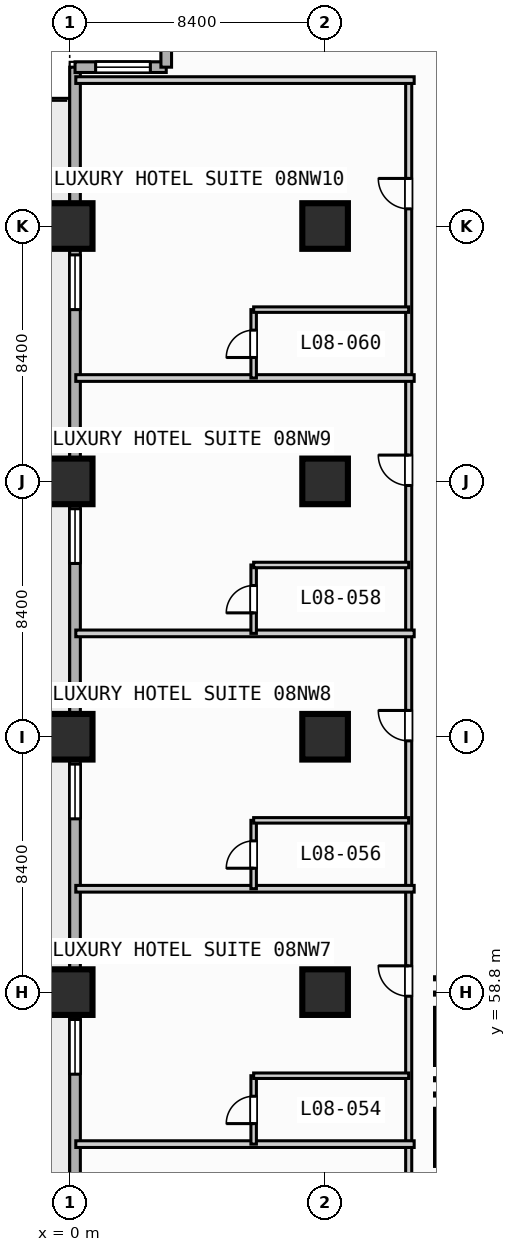
"""IFC4 building model, lengths in metres.
Left out: names, types, materials, properties, quantities, classifications, styles, units other than length and angle.
Written with IfcOpenShell. Run it as: python <this file> out.ifc"""

import sys

from ifc_helpers import new_model, si_unit, direction, frame, frame_2d, origin, origin_2d, place, context, subcontext, project, spatial, rectangle, extrude, element, fill, save


model = new_model("IFC4")
c1 = context("Model", 3, precision=1e-05, world=origin(), true_north=direction((0.0, 1.0)))
c2 = subcontext(c1, "Body", "Model", "MODEL_VIEW")
j1 = project(units=[si_unit("LENGTHUNIT", "METRE"), si_unit("PLANEANGLEUNIT", "RADIAN")], contexts=[c1])
p1 = place(None, origin())
s1 = spatial("IfcSite", under=j1, at=p1, CompositionType="ELEMENT")
p2 = place(p1, origin())
s2 = spatial("IfcBuilding", under=s1, at=p2, CompositionType="ELEMENT")
p3 = place(p2, frame((0.0, 0.0, 39.6)))
s3 = spatial("IfcBuildingStorey", under=s2, at=p3, CompositionType="ELEMENT", Elevation=39.6)
for number, where, z_axis, x_axis in (
    (1, (0.0, 58.8, 0.0), (0.0, 0.0, 1.0), (1.0, 0.0, 0.0)),
    (2, (0.0, 67.2, 0.0), (0.0, 0.0, 1.0), (1.0, 0.0, 0.0)),
    (3, (0.0, 75.6, 0.0), (0.0, 0.0, 1.0), (1.0, 0.0, 0.0)),
    (4, (0.0, 84.0, 0.0), (0.0, 0.0, 1.0), (1.0, 0.0, 0.0)),
    (5, (8.4, 58.8, 0.0), (0.0, 0.0, 1.0), (1.0, 0.0, 0.0)),
    (6, (8.4, 67.2, 0.0), (0.0, 0.0, 1.0), (1.0, 0.0, 0.0)),
    (7, (8.4, 75.6, 0.0), (0.0, 0.0, 1.0), (1.0, 0.0, 0.0)),
    (8, (8.4, 84.0, 0.0), (0.0, 0.0, 1.0), (1.0, 0.0, 0.0)),
):
    element("IfcColumn", number, at=place(p3, frame(where, z_axis=z_axis, x_axis=x_axis)), inside=s3, PredefinedType="COLUMN", context=c2, shape_type="SweptSolid", body=[
        extrude(rectangle(XDim=1.5, YDim=1.5, at=origin_2d()), origin(), (0.0, 0.0, 1.0), 3.8),
    ])
p4 = place(p3, frame((0.175, 3.175, 0.0), z_axis=(0.0, 0.0, 1.0), x_axis=(0.0, 1.0, 0.0)))
e9 = element("IfcWall", 9, at=p4, inside=s3, PredefinedType="STANDARD", context=c2, shape_type="SweptSolid", body=[
    extrude(rectangle(XDim=86.05, YDim=0.35, at=frame_2d((43.025, 0.0))), origin(), (0.0, 0.0, 1.0), 3.55),
])
p5 = place(p4, frame((42.825, 0.0, 0.0)))
e10 = element("IfcOpeningElement", 10, at=p5, cuts=e9, PredefinedType="OPENING", context=c2, shape_type="SweptSolid", body=[
    extrude(rectangle(XDim=1.4, YDim=2.2, at=frame_2d((0.7, 1.1))), frame((0.0, 0.185, 0.0), z_axis=(0.0, -1.0, 0.0), x_axis=(1.0, 0.0, 0.0)), (0.0, 0.0, 1.0), 0.37),
])
p6 = place(p4, frame((2.525, 0.0, 0.85)))
e11 = element("IfcOpeningElement", 11, at=p6, cuts=e9, PredefinedType="OPENING", context=c2, shape_type="SweptSolid", body=[
    extrude(rectangle(XDim=1.8, YDim=1.8, at=frame_2d((0.9, 0.9))), frame((0.0, 0.185, 0.0), z_axis=(0.0, -1.0, 0.0), x_axis=(1.0, 0.0, 0.0)), (0.0, 0.0, 1.0), 0.37),
])
p7 = place(p4, frame((10.925, 0.0, 0.85)))
e12 = element("IfcOpeningElement", 12, at=p7, cuts=e9, PredefinedType="OPENING", context=c2, shape_type="SweptSolid", body=[
    extrude(rectangle(XDim=1.8, YDim=1.8, at=frame_2d((0.9, 0.9))), frame((0.0, 0.185, 0.0), z_axis=(0.0, -1.0, 0.0), x_axis=(1.0, 0.0, 0.0)), (0.0, 0.0, 1.0), 0.37),
])
p8 = place(p4, frame((19.325, 0.0, 0.85)))
e13 = element("IfcOpeningElement", 13, at=p8, cuts=e9, PredefinedType="OPENING", context=c2, shape_type="SweptSolid", body=[
    extrude(rectangle(XDim=1.8, YDim=1.8, at=frame_2d((0.9, 0.9))), frame((0.0, 0.185, 0.0), z_axis=(0.0, -1.0, 0.0), x_axis=(1.0, 0.0, 0.0)), (0.0, 0.0, 1.0), 0.37),
])
p9 = place(p4, frame((27.725, 0.0, 0.85)))
e14 = element("IfcOpeningElement", 14, at=p9, cuts=e9, PredefinedType="OPENING", context=c2, shape_type="SweptSolid", body=[
    extrude(rectangle(XDim=1.8, YDim=1.8, at=frame_2d((0.9, 0.9))), frame((0.0, 0.185, 0.0), z_axis=(0.0, -1.0, 0.0), x_axis=(1.0, 0.0, 0.0)), (0.0, 0.0, 1.0), 0.37),
])
p10 = place(p4, frame((36.125, 0.0, 0.85)))
e15 = element("IfcOpeningElement", 15, at=p10, cuts=e9, PredefinedType="OPENING", context=c2, shape_type="SweptSolid", body=[
    extrude(rectangle(XDim=1.8, YDim=1.8, at=frame_2d((0.9, 0.9))), frame((0.0, 0.185, 0.0), z_axis=(0.0, -1.0, 0.0), x_axis=(1.0, 0.0, 0.0)), (0.0, 0.0, 1.0), 0.37),
])
p11 = place(p4, frame((52.925, 0.0, 0.85)))
e16 = element("IfcOpeningElement", 16, at=p11, cuts=e9, PredefinedType="OPENING", context=c2, shape_type="SweptSolid", body=[
    extrude(rectangle(XDim=1.8, YDim=1.8, at=frame_2d((0.9, 0.9))), frame((0.0, 0.185, 0.0), z_axis=(0.0, -1.0, 0.0), x_axis=(1.0, 0.0, 0.0)), (0.0, 0.0, 1.0), 0.37),
])
p12 = place(p4, frame((61.325, 0.0, 0.85)))
e17 = element("IfcOpeningElement", 17, at=p12, cuts=e9, PredefinedType="OPENING", context=c2, shape_type="SweptSolid", body=[
    extrude(rectangle(XDim=1.8, YDim=1.8, at=frame_2d((0.9, 0.9))), frame((0.0, 0.185, 0.0), z_axis=(0.0, -1.0, 0.0), x_axis=(1.0, 0.0, 0.0)), (0.0, 0.0, 1.0), 0.37),
])
p13 = place(p4, frame((69.725, 0.0, 0.85)))
e18 = element("IfcOpeningElement", 18, at=p13, cuts=e9, PredefinedType="OPENING", context=c2, shape_type="SweptSolid", body=[
    extrude(rectangle(XDim=1.8, YDim=1.8, at=frame_2d((0.9, 0.9))), frame((0.0, 0.185, 0.0), z_axis=(0.0, -1.0, 0.0), x_axis=(1.0, 0.0, 0.0)), (0.0, 0.0, 1.0), 0.37),
])
p14 = place(p4, frame((78.075, 0.0, 0.85)))
e19 = element("IfcOpeningElement", 19, at=p14, cuts=e9, PredefinedType="OPENING", context=c2, shape_type="SweptSolid", body=[
    extrude(rectangle(XDim=1.8, YDim=1.8, at=frame_2d((0.9, 0.9))), frame((0.0, 0.185, 0.0), z_axis=(0.0, -1.0, 0.0), x_axis=(1.0, 0.0, 0.0)), (0.0, 0.0, 1.0), 0.37),
])
p15 = place(p3, frame((0.175, 89.225, 0.0), z_axis=(0.0, 0.0, 1.0), x_axis=(1.0, 0.0, 0.0)))
e20 = element("IfcWall", 20, at=p15, inside=s3, PredefinedType="STANDARD", context=c2, shape_type="SweptSolid", body=[
    extrude(rectangle(XDim=3.0, YDim=0.35, at=frame_2d((1.5, 0.0))), origin(), (0.0, 0.0, 1.0), 3.55),
])
p16 = place(p15, frame((0.677, 0.0, 0.85)))
e21 = element("IfcOpeningElement", 21, at=p16, cuts=e20, PredefinedType="OPENING", context=c2, shape_type="SweptSolid", body=[
    extrude(rectangle(XDim=1.8, YDim=1.8, at=frame_2d((0.9, 0.9))), frame((0.0, 0.185, 0.0), z_axis=(0.0, -1.0, 0.0), x_axis=(1.0, 0.0, 0.0)), (0.0, 0.0, 1.0), 0.37),
])
p17 = place(p3, frame((3.175, 89.225, 0.0), z_axis=(0.0, 0.0, 1.0), x_axis=(0.0, 1.0, 0.0)))
e22 = element("IfcWall", 22, at=p17, inside=s3, PredefinedType="STANDARD", context=c2, shape_type="SweptSolid", body=[
    extrude(rectangle(XDim=3.0, YDim=0.35, at=frame_2d((1.5, 0.0))), origin(), (0.0, 0.0, 1.0), 3.55),
])
p18 = place(p3, frame((11.15, 3.4, 0.0), z_axis=(0.0, 0.0, 1.0), x_axis=(0.0, 1.0, 0.0)))
e23 = element("IfcWall", 23, at=p18, inside=s3, PredefinedType="PARTITIONING", context=c2, shape_type="SweptSolid", body=[
    extrude(rectangle(XDim=85.4, YDim=0.2, at=frame_2d((42.7, 0.0))), origin(), (0.0, 0.0, 1.0), 3.55),
])
p19 = place(p18, frame((4.865, 0.0, 0.0)))
e24 = element("IfcOpeningElement", 24, at=p19, cuts=e23, PredefinedType="OPENING", context=c2, shape_type="SweptSolid", body=[
    extrude(rectangle(XDim=1.0, YDim=2.15, at=frame_2d((0.5, 1.075))), frame((0.0, 0.11, 0.0), z_axis=(0.0, -1.0, 0.0), x_axis=(1.0, 0.0, 0.0)), (0.0, 0.0, 1.0), 0.22),
])
p20 = place(p18, frame((13.265, 0.0, 0.0)))
e25 = element("IfcOpeningElement", 25, at=p20, cuts=e23, PredefinedType="OPENING", context=c2, shape_type="SweptSolid", body=[
    extrude(rectangle(XDim=1.0, YDim=2.15, at=frame_2d((0.5, 1.075))), frame((0.0, 0.11, 0.0), z_axis=(0.0, -1.0, 0.0), x_axis=(1.0, 0.0, 0.0)), (0.0, 0.0, 1.0), 0.22),
])
p21 = place(p18, frame((21.665, 0.0, 0.0)))
e26 = element("IfcOpeningElement", 26, at=p21, cuts=e23, PredefinedType="OPENING", context=c2, shape_type="SweptSolid", body=[
    extrude(rectangle(XDim=1.0, YDim=2.15, at=frame_2d((0.5, 1.075))), frame((0.0, 0.11, 0.0), z_axis=(0.0, -1.0, 0.0), x_axis=(1.0, 0.0, 0.0)), (0.0, 0.0, 1.0), 0.22),
])
p22 = place(p18, frame((30.065, 0.0, 0.0)))
e27 = element("IfcOpeningElement", 27, at=p22, cuts=e23, PredefinedType="OPENING", context=c2, shape_type="SweptSolid", body=[
    extrude(rectangle(XDim=1.0, YDim=2.15, at=frame_2d((0.5, 1.075))), frame((0.0, 0.11, 0.0), z_axis=(0.0, -1.0, 0.0), x_axis=(1.0, 0.0, 0.0)), (0.0, 0.0, 1.0), 0.22),
])
p23 = place(p18, frame((38.465, 0.0, 0.0)))
e28 = element("IfcOpeningElement", 28, at=p23, cuts=e23, PredefinedType="OPENING", context=c2, shape_type="SweptSolid", body=[
    extrude(rectangle(XDim=1.0, YDim=2.15, at=frame_2d((0.5, 1.075))), frame((0.0, 0.11, 0.0), z_axis=(0.0, -1.0, 0.0), x_axis=(1.0, 0.0, 0.0)), (0.0, 0.0, 1.0), 0.22),
])
p24 = place(p18, frame((46.865, 0.0, 0.0)))
e29 = element("IfcOpeningElement", 29, at=p24, cuts=e23, PredefinedType="OPENING", context=c2, shape_type="SweptSolid", body=[
    extrude(rectangle(XDim=1.0, YDim=2.15, at=frame_2d((0.5, 1.075))), frame((0.0, 0.11, 0.0), z_axis=(0.0, -1.0, 0.0), x_axis=(1.0, 0.0, 0.0)), (0.0, 0.0, 1.0), 0.22),
])
p25 = place(p18, frame((55.265, 0.0, 0.0)))
e30 = element("IfcOpeningElement", 30, at=p25, cuts=e23, PredefinedType="OPENING", context=c2, shape_type="SweptSolid", body=[
    extrude(rectangle(XDim=1.0, YDim=2.15, at=frame_2d((0.5, 1.075))), frame((0.0, 0.11, 0.0), z_axis=(0.0, -1.0, 0.0), x_axis=(1.0, 0.0, 0.0)), (0.0, 0.0, 1.0), 0.22),
])
p26 = place(p18, frame((63.665, 0.0, 0.0)))
e31 = element("IfcOpeningElement", 31, at=p26, cuts=e23, PredefinedType="OPENING", context=c2, shape_type="SweptSolid", body=[
    extrude(rectangle(XDim=1.0, YDim=2.15, at=frame_2d((0.5, 1.075))), frame((0.0, 0.11, 0.0), z_axis=(0.0, -1.0, 0.0), x_axis=(1.0, 0.0, 0.0)), (0.0, 0.0, 1.0), 0.22),
])
p27 = place(p18, frame((72.065, 0.0, 0.0)))
e32 = element("IfcOpeningElement", 32, at=p27, cuts=e23, PredefinedType="OPENING", context=c2, shape_type="SweptSolid", body=[
    extrude(rectangle(XDim=1.0, YDim=2.15, at=frame_2d((0.5, 1.075))), frame((0.0, 0.11, 0.0), z_axis=(0.0, -1.0, 0.0), x_axis=(1.0, 0.0, 0.0)), (0.0, 0.0, 1.0), 0.22),
])
p28 = place(p18, frame((81.165, 0.0, 0.0)))
e33 = element("IfcOpeningElement", 33, at=p28, cuts=e23, PredefinedType="OPENING", context=c2, shape_type="SweptSolid", body=[
    extrude(rectangle(XDim=1.0, YDim=2.15, at=frame_2d((0.5, 1.075))), frame((0.0, 0.11, 0.0), z_axis=(0.0, -1.0, 0.0), x_axis=(1.0, 0.0, 0.0)), (0.0, 0.0, 1.0), 0.22),
])
p29 = place(p3, frame((0.2, 53.8, 0.0), z_axis=(0.0, 0.0, 1.0), x_axis=(1.0, 0.0, 0.0)))
e34 = element("IfcWall", 34, at=p29, inside=s3, PredefinedType="PARTITIONING", context=c2, shape_type="SweptSolid", body=[
    extrude(rectangle(XDim=11.13, YDim=0.22, at=frame_2d((5.565, 0.0))), origin(), (0.0, 0.0, 1.0), 3.55),
])
p30 = place(p3, frame((6.05, 53.8, 0.0), z_axis=(0.0, 0.0, 1.0), x_axis=(0.0, 1.0, 0.0)))
e35 = element("IfcWall", 35, at=p30, inside=s3, PredefinedType="PLUMBINGWALL", context=c2, shape_type="SweptSolid", body=[
    extrude(rectangle(XDim=2.25, YDim=0.18, at=frame_2d((1.125, 0.0))), origin(), (0.0, 0.0, 1.0), 3.55),
])
p31 = place(p30, frame((0.675, 0.0, 0.0)))
e36 = element("IfcOpeningElement", 36, at=p31, cuts=e35, PredefinedType="OPENING", context=c2, shape_type="SweptSolid", body=[
    extrude(rectangle(XDim=0.9, YDim=2.1, at=frame_2d((0.45, 1.05))), frame((0.0, 0.1, 0.0), z_axis=(0.0, -1.0, 0.0), x_axis=(1.0, 0.0, 0.0)), (0.0, 0.0, 1.0), 0.2),
])
p32 = place(p3, frame((6.05, 56.05, 0.0), z_axis=(0.0, 0.0, 1.0), x_axis=(1.0, 0.0, 0.0)))
e37 = element("IfcWall", 37, at=p32, inside=s3, PredefinedType="PLUMBINGWALL", context=c2, shape_type="SweptSolid", body=[
    extrude(rectangle(XDim=5.1, YDim=0.18, at=frame_2d((2.55, 0.0))), origin(), (0.0, 0.0, 1.0), 3.55),
])
p33 = place(p3, frame((0.2, 62.2, 0.0), z_axis=(0.0, 0.0, 1.0), x_axis=(1.0, 0.0, 0.0)))
e38 = element("IfcWall", 38, at=p33, inside=s3, PredefinedType="PARTITIONING", context=c2, shape_type="SweptSolid", body=[
    extrude(rectangle(XDim=11.13, YDim=0.22, at=frame_2d((5.565, 0.0))), origin(), (0.0, 0.0, 1.0), 3.55),
])
p34 = place(p3, frame((6.05, 62.2, 0.0), z_axis=(0.0, 0.0, 1.0), x_axis=(0.0, 1.0, 0.0)))
e39 = element("IfcWall", 39, at=p34, inside=s3, PredefinedType="PLUMBINGWALL", context=c2, shape_type="SweptSolid", body=[
    extrude(rectangle(XDim=2.25, YDim=0.18, at=frame_2d((1.125, 0.0))), origin(), (0.0, 0.0, 1.0), 3.55),
])
p35 = place(p34, frame((0.675, 0.0, 0.0)))
e40 = element("IfcOpeningElement", 40, at=p35, cuts=e39, PredefinedType="OPENING", context=c2, shape_type="SweptSolid", body=[
    extrude(rectangle(XDim=0.9, YDim=2.1, at=frame_2d((0.45, 1.05))), frame((0.0, 0.1, 0.0), z_axis=(0.0, -1.0, 0.0), x_axis=(1.0, 0.0, 0.0)), (0.0, 0.0, 1.0), 0.2),
])
p36 = place(p3, frame((6.05, 64.45, 0.0), z_axis=(0.0, 0.0, 1.0), x_axis=(1.0, 0.0, 0.0)))
e41 = element("IfcWall", 41, at=p36, inside=s3, PredefinedType="PLUMBINGWALL", context=c2, shape_type="SweptSolid", body=[
    extrude(rectangle(XDim=5.1, YDim=0.18, at=frame_2d((2.55, 0.0))), origin(), (0.0, 0.0, 1.0), 3.55),
])
p37 = place(p3, frame((0.2, 70.6, 0.0), z_axis=(0.0, 0.0, 1.0), x_axis=(1.0, 0.0, 0.0)))
e42 = element("IfcWall", 42, at=p37, inside=s3, PredefinedType="PARTITIONING", context=c2, shape_type="SweptSolid", body=[
    extrude(rectangle(XDim=11.13, YDim=0.22, at=frame_2d((5.565, 0.0))), origin(), (0.0, 0.0, 1.0), 3.55),
])
p38 = place(p3, frame((6.05, 70.6, 0.0), z_axis=(0.0, 0.0, 1.0), x_axis=(0.0, 1.0, 0.0)))
e43 = element("IfcWall", 43, at=p38, inside=s3, PredefinedType="PLUMBINGWALL", context=c2, shape_type="SweptSolid", body=[
    extrude(rectangle(XDim=2.25, YDim=0.18, at=frame_2d((1.125, 0.0))), origin(), (0.0, 0.0, 1.0), 3.55),
])
p39 = place(p38, frame((0.675, 0.0, 0.0)))
e44 = element("IfcOpeningElement", 44, at=p39, cuts=e43, PredefinedType="OPENING", context=c2, shape_type="SweptSolid", body=[
    extrude(rectangle(XDim=0.9, YDim=2.1, at=frame_2d((0.45, 1.05))), frame((0.0, 0.1, 0.0), z_axis=(0.0, -1.0, 0.0), x_axis=(1.0, 0.0, 0.0)), (0.0, 0.0, 1.0), 0.2),
])
p40 = place(p3, frame((6.05, 72.85, 0.0), z_axis=(0.0, 0.0, 1.0), x_axis=(1.0, 0.0, 0.0)))
e45 = element("IfcWall", 45, at=p40, inside=s3, PredefinedType="PLUMBINGWALL", context=c2, shape_type="SweptSolid", body=[
    extrude(rectangle(XDim=5.1, YDim=0.18, at=frame_2d((2.55, 0.0))), origin(), (0.0, 0.0, 1.0), 3.55),
])
for number, where, z_axis, x_axis in (
    (46, (0.2, 79.0, 0.0), (0.0, 0.0, 1.0), (1.0, 0.0, 0.0)),
    (47, (0.2, 88.8, 0.0), (0.0, 0.0, 1.0), (1.0, 0.0, 0.0)),
):
    element("IfcWall", number, at=place(p3, frame(where, z_axis=z_axis, x_axis=x_axis)), inside=s3, PredefinedType="PARTITIONING", context=c2, shape_type="SweptSolid", body=[
        extrude(rectangle(XDim=11.13, YDim=0.22, at=frame_2d((5.565, 0.0))), origin(), (0.0, 0.0, 1.0), 3.55),
    ])
p41 = place(p3, frame((6.05, 79.0, 0.0), z_axis=(0.0, 0.0, 1.0), x_axis=(0.0, 1.0, 0.0)))
e48 = element("IfcWall", 48, at=p41, inside=s3, PredefinedType="PLUMBINGWALL", context=c2, shape_type="SweptSolid", body=[
    extrude(rectangle(XDim=2.25, YDim=0.18, at=frame_2d((1.125, 0.0))), origin(), (0.0, 0.0, 1.0), 3.55),
])
p42 = place(p41, frame((0.675, 0.0, 0.0)))
e49 = element("IfcOpeningElement", 49, at=p42, cuts=e48, PredefinedType="OPENING", context=c2, shape_type="SweptSolid", body=[
    extrude(rectangle(XDim=0.9, YDim=2.1, at=frame_2d((0.45, 1.05))), frame((0.0, 0.1, 0.0), z_axis=(0.0, -1.0, 0.0), x_axis=(1.0, 0.0, 0.0)), (0.0, 0.0, 1.0), 0.2),
])
p43 = place(p3, frame((6.05, 81.25, 0.0), z_axis=(0.0, 0.0, 1.0), x_axis=(1.0, 0.0, 0.0)))
e50 = element("IfcWall", 50, at=p43, inside=s3, PredefinedType="PLUMBINGWALL", context=c2, shape_type="SweptSolid", body=[
    extrude(rectangle(XDim=5.1, YDim=0.18, at=frame_2d((2.55, 0.0))), origin(), (0.0, 0.0, 1.0), 3.55),
])
p44 = place(p11, origin())
e51 = element("IfcWindow", 51, at=p44, inside=s3, PartitioningType="SINGLE_PANEL", PredefinedType="WINDOW", context=c2, shape_type="SweptSolid", body=[
    extrude(rectangle(XDim=1.8, YDim=1.8, at=frame_2d((0.9, 0.9))), frame((0.0, 0.03, 0.0), z_axis=(0.0, -1.0, 0.0), x_axis=(1.0, 0.0, 0.0)), (0.0, 0.0, 1.0), 0.06),
])
fill(e16, e51)
p45 = place(p12, origin())
e52 = element("IfcWindow", 52, at=p45, inside=s3, PartitioningType="SINGLE_PANEL", PredefinedType="WINDOW", context=c2, shape_type="SweptSolid", body=[
    extrude(rectangle(XDim=1.8, YDim=1.8, at=frame_2d((0.9, 0.9))), frame((0.0, 0.03, 0.0), z_axis=(0.0, -1.0, 0.0), x_axis=(1.0, 0.0, 0.0)), (0.0, 0.0, 1.0), 0.06),
])
fill(e17, e52)
p46 = place(p13, origin())
e53 = element("IfcWindow", 53, at=p46, inside=s3, PartitioningType="SINGLE_PANEL", PredefinedType="WINDOW", context=c2, shape_type="SweptSolid", body=[
    extrude(rectangle(XDim=1.8, YDim=1.8, at=frame_2d((0.9, 0.9))), frame((0.0, 0.03, 0.0), z_axis=(0.0, -1.0, 0.0), x_axis=(1.0, 0.0, 0.0)), (0.0, 0.0, 1.0), 0.06),
])
fill(e18, e53)
p47 = place(p14, origin())
e54 = element("IfcWindow", 54, at=p47, inside=s3, PartitioningType="SINGLE_PANEL", PredefinedType="WINDOW", context=c2, shape_type="SweptSolid", body=[
    extrude(rectangle(XDim=1.8, YDim=1.8, at=frame_2d((0.9, 0.9))), frame((0.0, 0.03, 0.0), z_axis=(0.0, -1.0, 0.0), x_axis=(1.0, 0.0, 0.0)), (0.0, 0.0, 1.0), 0.06),
])
fill(e19, e54)
p48 = place(p16, origin())
e55 = element("IfcWindow", 55, at=p48, inside=s3, PartitioningType="SINGLE_PANEL", PredefinedType="WINDOW", context=c2, shape_type="SweptSolid", body=[
    extrude(rectangle(XDim=1.8, YDim=1.8, at=frame_2d((0.9, 0.9))), frame((0.0, 0.03, 0.0), z_axis=(0.0, -1.0, 0.0), x_axis=(1.0, 0.0, 0.0)), (0.0, 0.0, 1.0), 0.06),
])
fill(e21, e55)
p49 = place(p25, origin())
e56 = element("IfcDoor", 56, at=p49, inside=s3, OperationType="SINGLE_SWING_RIGHT", PredefinedType="DOOR", context=c2, shape_type="SweptSolid", body=[
    extrude(rectangle(XDim=1.0, YDim=2.15, at=frame_2d((0.5, 1.075))), frame((0.0, 0.025, 0.0), z_axis=(0.0, -1.0, 0.0), x_axis=(1.0, 0.0, 0.0)), (0.0, 0.0, 1.0), 0.05),
])
fill(e30, e56)
p50 = place(p26, origin())
e57 = element("IfcDoor", 57, at=p50, inside=s3, OperationType="SINGLE_SWING_RIGHT", PredefinedType="DOOR", context=c2, shape_type="SweptSolid", body=[
    extrude(rectangle(XDim=1.0, YDim=2.15, at=frame_2d((0.5, 1.075))), frame((0.0, 0.025, 0.0), z_axis=(0.0, -1.0, 0.0), x_axis=(1.0, 0.0, 0.0)), (0.0, 0.0, 1.0), 0.05),
])
fill(e31, e57)
p51 = place(p27, origin())
e58 = element("IfcDoor", 58, at=p51, inside=s3, OperationType="SINGLE_SWING_RIGHT", PredefinedType="DOOR", context=c2, shape_type="SweptSolid", body=[
    extrude(rectangle(XDim=1.0, YDim=2.15, at=frame_2d((0.5, 1.075))), frame((0.0, 0.025, 0.0), z_axis=(0.0, -1.0, 0.0), x_axis=(1.0, 0.0, 0.0)), (0.0, 0.0, 1.0), 0.05),
])
fill(e32, e58)
p52 = place(p28, origin())
e59 = element("IfcDoor", 59, at=p52, inside=s3, OperationType="SINGLE_SWING_RIGHT", PredefinedType="DOOR", context=c2, shape_type="SweptSolid", body=[
    extrude(rectangle(XDim=1.0, YDim=2.15, at=frame_2d((0.5, 1.075))), frame((0.0, 0.025, 0.0), z_axis=(0.0, -1.0, 0.0), x_axis=(1.0, 0.0, 0.0)), (0.0, 0.0, 1.0), 0.05),
])
fill(e33, e59)
p53 = place(p31, origin())
e60 = element("IfcDoor", 60, at=p53, inside=s3, OperationType="SINGLE_SWING_LEFT", PredefinedType="DOOR", context=c2, shape_type="SweptSolid", body=[
    extrude(rectangle(XDim=0.9, YDim=2.1, at=frame_2d((0.45, 1.05))), frame((0.0, 0.025, 0.0), z_axis=(0.0, -1.0, 0.0), x_axis=(1.0, 0.0, 0.0)), (0.0, 0.0, 1.0), 0.05),
])
fill(e36, e60)
p54 = place(p35, origin())
e61 = element("IfcDoor", 61, at=p54, inside=s3, OperationType="SINGLE_SWING_LEFT", PredefinedType="DOOR", context=c2, shape_type="SweptSolid", body=[
    extrude(rectangle(XDim=0.9, YDim=2.1, at=frame_2d((0.45, 1.05))), frame((0.0, 0.025, 0.0), z_axis=(0.0, -1.0, 0.0), x_axis=(1.0, 0.0, 0.0)), (0.0, 0.0, 1.0), 0.05),
])
fill(e40, e61)
p55 = place(p39, origin())
e62 = element("IfcDoor", 62, at=p55, inside=s3, OperationType="SINGLE_SWING_LEFT", PredefinedType="DOOR", context=c2, shape_type="SweptSolid", body=[
    extrude(rectangle(XDim=0.9, YDim=2.1, at=frame_2d((0.45, 1.05))), frame((0.0, 0.025, 0.0), z_axis=(0.0, -1.0, 0.0), x_axis=(1.0, 0.0, 0.0)), (0.0, 0.0, 1.0), 0.05),
])
fill(e44, e62)
p56 = place(p42, origin())
e63 = element("IfcDoor", 63, at=p56, inside=s3, OperationType="SINGLE_SWING_LEFT", PredefinedType="DOOR", context=c2, shape_type="SweptSolid", body=[
    extrude(rectangle(XDim=0.9, YDim=2.1, at=frame_2d((0.45, 1.05))), frame((0.0, 0.025, 0.0), z_axis=(0.0, -1.0, 0.0), x_axis=(1.0, 0.0, 0.0)), (0.0, 0.0, 1.0), 0.05),
])
fill(e49, e63)
save(model, sys.argv[1])
